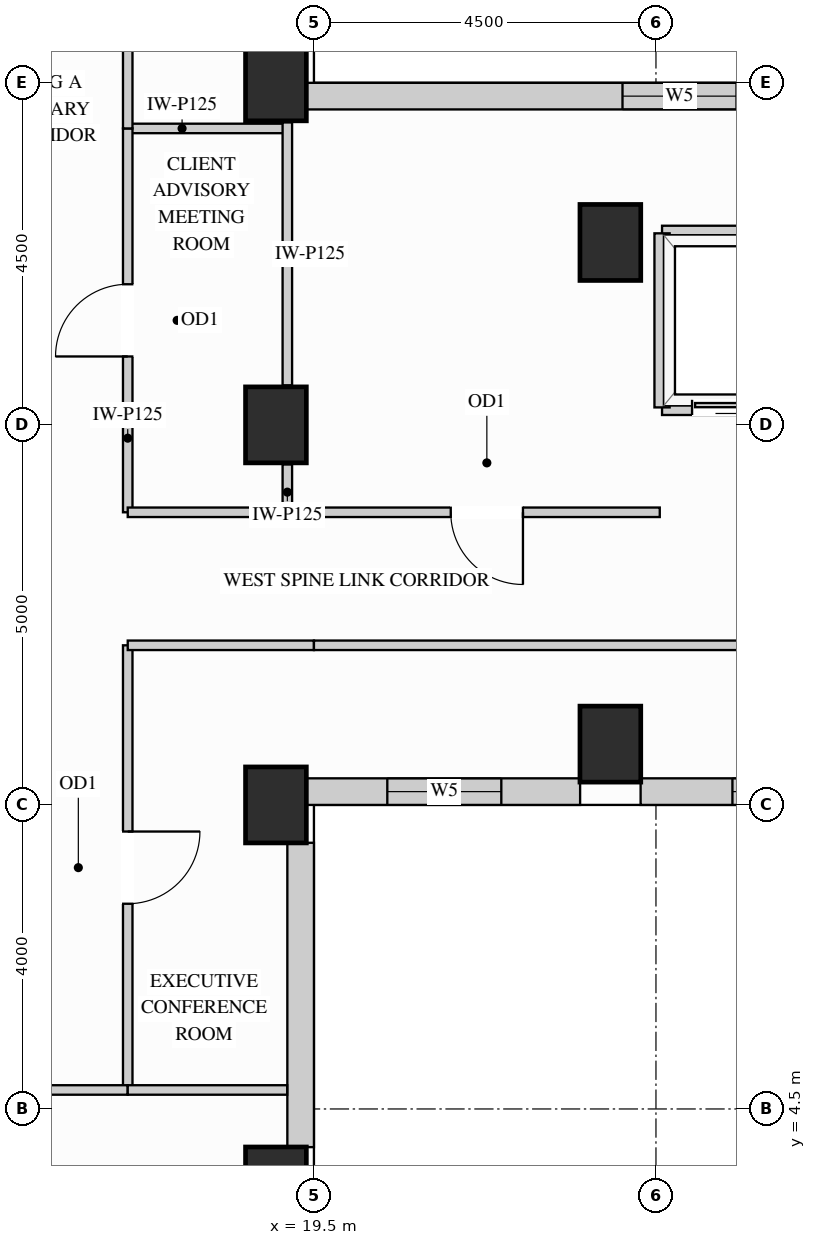
"""IFC4 building model, lengths in metres.
Left out: names, types, materials, properties, quantities, classifications, styles, units other than length and angle.
Written with IfcOpenShell. Run it as: python <this file> out.ifc"""

import sys

from ifc_helpers import new_model, si_unit, direction, frame, frame_2d, origin, origin_2d, place, context, subcontext, project, spatial, rectangle, extrude, source, transform, mapped, element, fill, save


model = new_model("IFC4")
c1 = context("Model", 3, precision=1e-05, world=origin(), true_north=direction((0.0, 1.0)))
c2 = subcontext(c1, "Body", "Model", "MODEL_VIEW")
j1 = project(units=[si_unit("LENGTHUNIT", "METRE"), si_unit("PLANEANGLEUNIT", "RADIAN")], contexts=[c1])
p1 = place(None, origin())
s1 = spatial("IfcSite", under=j1, at=p1, CompositionType="ELEMENT")
p2 = place(p1, origin())
s2 = spatial("IfcBuilding", under=s1, at=p2, CompositionType="ELEMENT")
p3 = place(p2, frame((0.0, 0.0, 164.7)))
s3 = spatial("IfcBuildingStorey", under=s2, at=p3, CompositionType="ELEMENT", Elevation=164.7)
m1 = source(origin(), c2, "Body", "SweptSolid", [
    extrude(rectangle(XDim=0.8, YDim=1.0, at=origin_2d()), origin(), (0.0, 0.0, 1.0), 3.4),
])
for number, where, z_axis, x_axis in (
    (1, (19.0, 13.5, 0.0), (0.0, 0.0, 1.0), (1.0, 0.0, 0.0)),
    (2, (19.0, 18.0, 0.0), (0.0, 0.0, 1.0), (1.0, 0.0, 0.0)),
    (3, (19.0, 3.5, 0.0), (0.0, 0.0, 1.0), (1.0, 0.0, 0.0)),
    (4, (19.0, 8.5, 0.0), (0.0, 0.0, 1.0), (1.0, 0.0, 0.0)),
    (5, (23.4, 15.9, 0.0), (0.0, 0.0, 1.0), (1.0, 0.0, 0.0)),
    (6, (23.4, 9.3, 0.0), (0.0, 0.0, 1.0), (1.0, 0.0, 0.0)),
):
    element("IfcColumn", number, at=place(p3, frame(where, z_axis=z_axis, x_axis=x_axis)), inside=s3, PredefinedType="COLUMN", context=c2, shape_type="MappedRepresentation", body=[
        mapped(m1, transform((0.0, 0.0, 0.0), x_axis=(1.0, 0.0, 0.0), y_axis=(0.0, 1.0, 0.0), z_axis=(0.0, 0.0, 1.0))),
    ])
m2 = source(origin(), c2, "Body", "SweptSolid", [
    extrude(rectangle(XDim=4.004, YDim=0.35, at=frame_2d((2.002, 0.0))), origin(), (0.0, 0.0, 1.0), 2.612),
])
p4 = place(p3, frame((19.325, 3.998, 0.0), z_axis=(0.0, 0.0, 1.0), x_axis=(0.0, 1.0, 0.0)))
e7 = element("IfcWall", 7, at=p4, inside=s3, PredefinedType="SOLIDWALL", context=c2, shape_type="MappedRepresentation", body=[
    mapped(m2, transform((0.0, 0.0, 0.0), x_axis=(1.0, 0.0, 0.0), y_axis=(0.0, 1.0, 0.0), z_axis=(0.0, 0.0, 1.0))),
])
p5 = place(p3, frame((19.398, 8.675, 0.0), z_axis=(0.0, 0.0, 1.0), x_axis=(1.0, 0.0, 0.0)))
e8 = element("IfcWall", 8, at=p5, inside=s3, PredefinedType="SOLIDWALL", context=c2, shape_type="SweptSolid", body=[
    extrude(rectangle(XDim=3.604, YDim=0.35, at=frame_2d((1.802, 0.0))), origin(), (0.0, 0.0, 1.0), 3.385),
])
p6 = place(p5, frame((1.067, 0.0, 0.78)))
e9 = element("IfcOpeningElement", 9, at=p6, cuts=e8, PredefinedType="OPENING", context=c2, shape_type="SweptSolid", body=[
    extrude(rectangle(XDim=1.5, YDim=2.0, at=frame_2d((0.75, 1.0))), frame((0.0, 0.185, 0.0), z_axis=(0.0, -1.0, 0.0), x_axis=(1.0, 0.0, 0.0)), (0.0, 0.0, 1.0), 0.37),
])
p7 = place(p3, frame((23.798, 8.675, 0.0), z_axis=(0.0, 0.0, 1.0), x_axis=(1.0, 0.0, 0.0)))
e10 = element("IfcWall", 10, at=p7, inside=s3, PredefinedType="SOLIDWALL", context=c2, shape_type="SweptSolid", body=[
    extrude(rectangle(XDim=6.304, YDim=0.35, at=frame_2d((3.152, 0.0))), origin(), (0.0, 0.0, 1.0), 3.385),
])
p8 = place(p7, frame((1.208, 0.0, 0.78)))
e11 = element("IfcOpeningElement", 11, at=p8, cuts=e10, PredefinedType="OPENING", context=c2, shape_type="SweptSolid", body=[
    extrude(rectangle(XDim=1.5, YDim=2.0, at=frame_2d((0.75, 1.0))), frame((0.0, 0.185, 0.0), z_axis=(0.0, -1.0, 0.0), x_axis=(1.0, 0.0, 0.0)), (0.0, 0.0, 1.0), 0.37),
])
p9 = place(p7, frame((3.596, 0.0, 0.78)))
e12 = element("IfcOpeningElement", 12, at=p9, cuts=e10, PredefinedType="OPENING", context=c2, shape_type="SweptSolid", body=[
    extrude(rectangle(XDim=1.5, YDim=2.0, at=frame_2d((0.75, 1.0))), frame((0.0, 0.185, 0.0), z_axis=(0.0, -1.0, 0.0), x_axis=(1.0, 0.0, 0.0)), (0.0, 0.0, 1.0), 0.37),
])
p10 = place(p3, frame((34.502, 17.825, 0.0), z_axis=(0.0, 0.0, 1.0), x_axis=(-1.0, 0.0, 0.0)))
e13 = element("IfcWall", 13, at=p10, inside=s3, PredefinedType="SOLIDWALL", context=c2, shape_type="SweptSolid", body=[
    extrude(rectangle(XDim=15.104, YDim=0.35, at=frame_2d((7.552, 0.0))), origin(), (0.0, 0.0, 1.0), 3.385),
])
p11 = place(p10, frame((4.131, 0.0, 0.78)))
e14 = element("IfcOpeningElement", 14, at=p11, cuts=e13, PredefinedType="OPENING", context=c2, shape_type="SweptSolid", body=[
    extrude(rectangle(XDim=1.5, YDim=2.0, at=frame_2d((0.75, 1.0))), frame((0.0, 0.185, 0.0), z_axis=(0.0, -1.0, 0.0), x_axis=(1.0, 0.0, 0.0)), (0.0, 0.0, 1.0), 0.37),
])
p12 = place(p10, frame((9.442, 0.0, 0.78)))
e15 = element("IfcOpeningElement", 15, at=p12, cuts=e13, PredefinedType="OPENING", context=c2, shape_type="SweptSolid", body=[
    extrude(rectangle(XDim=1.5, YDim=2.0, at=frame_2d((0.75, 1.0))), frame((0.0, 0.185, 0.0), z_axis=(0.0, -1.0, 0.0), x_axis=(1.0, 0.0, 0.0)), (0.0, 0.0, 1.0), 0.37),
])
m3 = source(origin(), c2, "Body", "SweptSolid", [
    extrude(rectangle(XDim=2.1, YDim=0.125, at=frame_2d((1.05, 0.0))), origin(), (0.0, 0.0, 1.0), 3.385),
])
p13 = place(p3, frame((17.05, 17.4, 0.0), z_axis=(0.0, 0.0, 1.0), x_axis=(1.0, 0.0, 0.0)))
e16 = element("IfcWall", 16, at=p13, inside=s3, PredefinedType="PARTITIONING", context=c2, shape_type="MappedRepresentation", body=[
    mapped(m3, transform((0.0, 0.0, 0.0), x_axis=(1.0, 0.0, 0.0), y_axis=(0.0, 1.0, 0.0), z_axis=(0.0, 0.0, 1.0))),
])
m4 = source(origin(), c2, "Body", "SweptSolid", [
    extrude(rectangle(XDim=0.63, YDim=0.125, at=frame_2d((0.315, 0.0))), origin(), (0.0, 0.0, 1.0), 2.773),
])
p14 = place(p3, frame((19.15, 12.35, 0.0), z_axis=(0.0, 0.0, 1.0), x_axis=(0.0, 1.0, 0.0)))
e17 = element("IfcWall", 17, at=p14, inside=s3, PredefinedType="PARTITIONING", context=c2, shape_type="MappedRepresentation", body=[
    mapped(m4, transform((0.0, 0.0, 0.0), x_axis=(1.0, 0.0, 0.0), y_axis=(0.0, 1.0, 0.0), z_axis=(0.0, 0.0, 1.0))),
])
m5 = source(origin(), c2, "Body", "SweptSolid", [
    extrude(rectangle(XDim=3.46, YDim=0.125, at=frame_2d((1.73, 0.0))), origin(), (0.0, 0.0, 1.0), 2.773),
])
p15 = place(p3, frame((19.15, 14.02, 0.0), z_axis=(0.0, 0.0, 1.0), x_axis=(0.0, 1.0, 0.0)))
e18 = element("IfcWall", 18, at=p15, inside=s3, PredefinedType="PARTITIONING", context=c2, shape_type="MappedRepresentation", body=[
    mapped(m5, transform((0.0, 0.0, 0.0), x_axis=(1.0, 0.0, 0.0), y_axis=(0.0, 1.0, 0.0), z_axis=(0.0, 0.0, 1.0))),
])
p16 = place(p3, frame((17.05, 12.35, 0.0), z_axis=(0.0, 0.0, 1.0), x_axis=(0.0, 1.0, 0.0)))
e19 = element("IfcWall", 19, at=p16, inside=s3, PredefinedType="PARTITIONING", context=c2, shape_type="SweptSolid", body=[
    extrude(rectangle(XDim=5.05, YDim=0.125, at=frame_2d((2.525, 0.0))), origin(), (0.0, 0.0, 1.0), 3.385),
])
p17 = place(p16, frame((2.05, 0.0, 0.0)))
e20 = element("IfcOpeningElement", 20, at=p17, cuts=e19, PredefinedType="OPENING", context=c2, shape_type="SweptSolid", body=[
    extrude(rectangle(XDim=0.95, YDim=2.15, at=frame_2d((0.475, 1.075))), frame((0.0, 0.073, 0.0), z_axis=(0.0, -1.0, 0.0), x_axis=(1.0, 0.0, 0.0)), (0.0, 0.0, 1.0), 0.145),
])
p18 = place(p3, frame((17.05, 17.4, 0.0), z_axis=(0.0, 0.0, 1.0), x_axis=(0.0, 1.0, 0.0)))
e21 = element("IfcWall", 21, at=p18, inside=s3, PredefinedType="PARTITIONING", context=c2, shape_type="SweptSolid", body=[
    extrude(rectangle(XDim=5.95, YDim=0.125, at=frame_2d((2.975, 0.0))), origin(), (0.0, 0.0, 1.0), 3.385),
])
p19 = place(p18, frame((2.5, 0.0, 0.0)))
e22 = element("IfcOpeningElement", 22, at=p19, cuts=e21, PredefinedType="OPENING", context=c2, shape_type="SweptSolid", body=[
    extrude(rectangle(XDim=0.95, YDim=2.15, at=frame_2d((0.475, 1.075))), frame((0.0, 0.073, 0.0), z_axis=(0.0, -1.0, 0.0), x_axis=(1.0, 0.0, 0.0)), (0.0, 0.0, 1.0), 0.145),
])
p20 = place(p3, frame((17.05, 4.75, 0.0), z_axis=(0.0, 0.0, 1.0), x_axis=(0.0, 1.0, 0.0)))
e23 = element("IfcWall", 23, at=p20, inside=s3, PredefinedType="PARTITIONING", context=c2, shape_type="SweptSolid", body=[
    extrude(rectangle(XDim=5.85, YDim=0.125, at=frame_2d((2.925, 0.0))), origin(), (0.0, 0.0, 1.0), 3.385),
])
p21 = place(p20, frame((2.45, 0.0, 0.0)))
e24 = element("IfcOpeningElement", 24, at=p21, cuts=e23, PredefinedType="OPENING", context=c2, shape_type="SweptSolid", body=[
    extrude(rectangle(XDim=0.95, YDim=2.15, at=frame_2d((0.475, 1.075))), frame((0.0, 0.073, 0.0), z_axis=(0.0, -1.0, 0.0), x_axis=(1.0, 0.0, 0.0)), (0.0, 0.0, 1.0), 0.145),
])
m6 = source(origin(), c2, "Body", "SweptSolid", [
    extrude(rectangle(XDim=2.45, YDim=0.125, at=frame_2d((1.225, 0.0))), origin(), (0.0, 0.0, 1.0), 3.385),
])
p22 = place(p3, frame((17.05, 12.35, 0.0), z_axis=(0.0, 0.0, 1.0), x_axis=(1.0, 0.0, 0.0)))
e25 = element("IfcWall", 25, at=p22, inside=s3, PredefinedType="PARTITIONING", context=c2, shape_type="MappedRepresentation", body=[
    mapped(m6, transform((0.0, 0.0, 0.0), x_axis=(1.0, 0.0, 0.0), y_axis=(0.0, 1.0, 0.0), z_axis=(0.0, 0.0, 1.0))),
])
p23 = place(p3, frame((19.5, 12.35, 0.0), z_axis=(0.0, 0.0, 1.0), x_axis=(1.0, 0.0, 0.0)))
e26 = element("IfcWall", 26, at=p23, inside=s3, PredefinedType="PARTITIONING", context=c2, shape_type="SweptSolid", body=[
    extrude(rectangle(XDim=4.55, YDim=0.125, at=frame_2d((2.275, 0.0))), origin(), (0.0, 0.0, 1.0), 3.385),
])
p24 = place(p23, frame((1.8, 0.0, 0.0)))
e27 = element("IfcOpeningElement", 27, at=p24, cuts=e26, PredefinedType="OPENING", context=c2, shape_type="SweptSolid", body=[
    extrude(rectangle(XDim=0.95, YDim=2.15, at=frame_2d((0.475, 1.075))), frame((0.0, 0.073, 0.0), z_axis=(0.0, -1.0, 0.0), x_axis=(1.0, 0.0, 0.0)), (0.0, 0.0, 1.0), 0.145),
])
p25 = place(p3, frame((17.05, 10.6, 0.0), z_axis=(0.0, 0.0, 1.0), x_axis=(1.0, 0.0, 0.0)))
e28 = element("IfcWall", 28, at=p25, inside=s3, PredefinedType="PARTITIONING", context=c2, shape_type="MappedRepresentation", body=[
    mapped(m6, transform((0.0, 0.0, 0.0), x_axis=(1.0, 0.0, 0.0), y_axis=(0.0, 1.0, 0.0), z_axis=(0.0, 0.0, 1.0))),
])
p26 = place(p3, frame((19.5, 10.6, 0.0), z_axis=(0.0, 0.0, 1.0), x_axis=(1.0, 0.0, 0.0)))
e29 = element("IfcWall", 29, at=p26, inside=s3, PredefinedType="PARTITIONING", context=c2, shape_type="SweptSolid", body=[
    extrude(rectangle(XDim=14.9, YDim=0.125, at=frame_2d((7.45, 0.0))), origin(), (0.0, 0.0, 1.0), 3.385),
])
p27 = place(p26, frame((6.975, 0.0, 0.0)))
e30 = element("IfcOpeningElement", 30, at=p27, cuts=e29, PredefinedType="OPENING", context=c2, shape_type="SweptSolid", body=[
    extrude(rectangle(XDim=0.95, YDim=2.15, at=frame_2d((0.475, 1.075))), frame((0.0, 0.073, 0.0), z_axis=(0.0, -1.0, 0.0), x_axis=(1.0, 0.0, 0.0)), (0.0, 0.0, 1.0), 0.145),
])
p28 = place(p3, frame((13.026, 4.75, 0.0), z_axis=(0.0, 0.0, 1.0), x_axis=(1.0, 0.0, 0.0)))
e31 = element("IfcWall", 31, at=p28, inside=s3, PredefinedType="PARTITIONING", context=c2, shape_type="SweptSolid", body=[
    extrude(rectangle(XDim=4.024, YDim=0.125, at=frame_2d((2.012, 0.0))), origin(), (0.0, 0.0, 1.0), 2.848),
])
p29 = place(p28, frame((1.537, 0.0, 0.0)))
e32 = element("IfcOpeningElement", 32, at=p29, cuts=e31, PredefinedType="OPENING", context=c2, shape_type="SweptSolid", body=[
    extrude(rectangle(XDim=0.95, YDim=2.15, at=frame_2d((0.475, 1.075))), frame((0.0, 0.073, 0.0), z_axis=(0.0, -1.0, 0.0), x_axis=(1.0, 0.0, 0.0)), (0.0, 0.0, 1.0), 0.145),
])
m7 = source(origin(), c2, "Body", "SweptSolid", [
    extrude(rectangle(XDim=2.098, YDim=0.125, at=frame_2d((1.049, 0.0))), origin(), (0.0, 0.0, 1.0), 2.848),
])
p30 = place(p3, frame((17.05, 4.75, 0.0), z_axis=(0.0, 0.0, 1.0), x_axis=(1.0, 0.0, 0.0)))
e33 = element("IfcWall", 33, at=p30, inside=s3, PredefinedType="PARTITIONING", context=c2, shape_type="MappedRepresentation", body=[
    mapped(m7, transform((0.0, 0.0, 0.0), x_axis=(1.0, 0.0, 0.0), y_axis=(0.0, 1.0, 0.0), z_axis=(0.0, 0.0, 1.0))),
])
m8 = source(origin(), c2, "Body", "SweptSolid", [
    extrude(rectangle(XDim=1.89, YDim=0.2, at=frame_2d((0.945, 0.0))), origin(), (0.0, 0.0, 1.0), 2.773),
])
p31 = place(p3, frame((24.08, 16.02, 0.0), z_axis=(0.0, 0.0, 1.0), x_axis=(1.0, 0.0, 0.0)))
e34 = element("IfcWall", 34, at=p31, inside=s3, PredefinedType="PARTITIONING", context=c2, shape_type="MappedRepresentation", body=[
    mapped(m8, transform((0.0, 0.0, 0.0), x_axis=(1.0, 0.0, 0.0), y_axis=(0.0, 1.0, 0.0), z_axis=(0.0, 0.0, 1.0))),
])
p32 = place(p3, frame((24.08, 13.73, 0.0), z_axis=(0.0, 0.0, 1.0), x_axis=(1.0, 0.0, 0.0)))
e35 = element("IfcWall", 35, at=p32, inside=s3, PredefinedType="PARTITIONING", context=c2, shape_type="SweptSolid", body=[
    extrude(rectangle(XDim=1.89, YDim=0.2, at=frame_2d((0.945, 0.0))), origin(), (0.0, 0.0, 1.0), 2.466),
])
p33 = place(p32, frame((0.395, 0.0, 0.0)))
e36 = element("IfcOpeningElement", 36, at=p33, cuts=e35, PredefinedType="OPENING", context=c2, shape_type="SweptSolid", body=[
    extrude(rectangle(XDim=1.1, YDim=2.2, at=frame_2d((0.55, 1.1))), frame((0.0, 0.11, 0.0), z_axis=(0.0, -1.0, 0.0), x_axis=(1.0, 0.0, 0.0)), (0.0, 0.0, 1.0), 0.22),
])
m9 = source(origin(), c2, "Body", "SweptSolid", [
    extrude(rectangle(XDim=2.29, YDim=0.2, at=frame_2d((1.145, 0.0))), origin(), (0.0, 0.0, 1.0), 3.385),
])
p34 = place(p3, frame((24.08, 13.73, 0.0), z_axis=(0.0, 0.0, 1.0), x_axis=(0.0, 1.0, 0.0)))
e37 = element("IfcWall", 37, at=p34, inside=s3, PredefinedType="PARTITIONING", context=c2, shape_type="MappedRepresentation", body=[
    mapped(m9, transform((0.0, 0.0, 0.0), x_axis=(1.0, 0.0, 0.0), y_axis=(0.0, 1.0, 0.0), z_axis=(0.0, 0.0, 1.0))),
])
m10 = source(origin(), c2, "Body", "SweptSolid", [
    extrude(rectangle(XDim=1.1, YDim=2.2, at=frame_2d((0.55, 1.1))), frame((0.0, 0.025, 0.0), z_axis=(0.0, -1.0, 0.0), x_axis=(1.0, 0.0, 0.0)), (0.0, 0.0, 1.0), 0.05),
])
p35 = place(p33, origin())
e38 = element("IfcDoor", 38, at=p35, inside=s3, OperationType="SLIDING_TO_LEFT", PredefinedType="DOOR", context=c2, shape_type="MappedRepresentation", body=[
    mapped(m10, transform((0.0, 0.0, 0.0), x_axis=(1.0, 0.0, 0.0), y_axis=(0.0, 1.0, 0.0), z_axis=(0.0, 0.0, 1.0))),
])
fill(e36, e38)
m11 = source(origin(), c2, "Body", "SweptSolid", [
    extrude(rectangle(XDim=0.95, YDim=2.15, at=frame_2d((0.475, 1.075))), frame((0.0, 0.025, 0.0), z_axis=(0.0, -1.0, 0.0), x_axis=(1.0, 0.0, 0.0)), (0.0, 0.0, 1.0), 0.05),
])
p36 = place(p21, origin())
e39 = element("IfcDoor", 39, at=p36, inside=s3, OperationType="SINGLE_SWING_RIGHT", PredefinedType="DOOR", context=c2, shape_type="MappedRepresentation", body=[
    mapped(m11, transform((0.0, 0.0, 0.0), x_axis=(1.0, 0.0, 0.0), y_axis=(0.0, 1.0, 0.0), z_axis=(0.0, 0.0, 1.0))),
])
fill(e24, e39)
p37 = place(p17, origin())
e40 = element("IfcDoor", 40, at=p37, inside=s3, OperationType="SINGLE_SWING_LEFT", PredefinedType="DOOR", context=c2, shape_type="MappedRepresentation", body=[
    mapped(m11, transform((0.0, 0.0, 0.0), x_axis=(1.0, 0.0, 0.0), y_axis=(0.0, 1.0, 0.0), z_axis=(0.0, 0.0, 1.0))),
])
fill(e20, e40)
p38 = place(p24, origin())
e41 = element("IfcDoor", 41, at=p38, inside=s3, OperationType="SINGLE_SWING_RIGHT", PredefinedType="DOOR", context=c2, shape_type="MappedRepresentation", body=[
    mapped(m11, transform((0.0, 0.0, 0.0), x_axis=(1.0, 0.0, 0.0), y_axis=(0.0, 1.0, 0.0), z_axis=(0.0, 0.0, 1.0))),
])
fill(e27, e41)
m12 = source(origin(), c2, "Body", "SweptSolid", [
    extrude(rectangle(XDim=1.5, YDim=2.0, at=frame_2d((0.75, 1.0))), frame((0.0, 0.03, 0.0), z_axis=(0.0, -1.0, 0.0), x_axis=(1.0, 0.0, 0.0)), (0.0, 0.0, 1.0), 0.06),
])
p39 = place(p6, origin())
e42 = element("IfcWindow", 42, at=p39, inside=s3, PartitioningType="SINGLE_PANEL", PredefinedType="WINDOW", context=c2, shape_type="MappedRepresentation", body=[
    mapped(m12, transform((0.0, 0.0, 0.0), x_axis=(1.0, 0.0, 0.0), y_axis=(0.0, 1.0, 0.0), z_axis=(0.0, 0.0, 1.0))),
])
fill(e9, e42)
p40 = place(p8, origin())
e43 = element("IfcWindow", 43, at=p40, inside=s3, PartitioningType="SINGLE_PANEL", PredefinedType="WINDOW", context=c2, shape_type="MappedRepresentation", body=[
    mapped(m12, transform((0.0, 0.0, 0.0), x_axis=(1.0, 0.0, 0.0), y_axis=(0.0, 1.0, 0.0), z_axis=(0.0, 0.0, 1.0))),
])
fill(e11, e43)
p41 = place(p12, origin())
e44 = element("IfcWindow", 44, at=p41, inside=s3, PartitioningType="SINGLE_PANEL", PredefinedType="WINDOW", context=c2, shape_type="MappedRepresentation", body=[
    mapped(m12, transform((0.0, 0.0, 0.0), x_axis=(1.0, 0.0, 0.0), y_axis=(0.0, 1.0, 0.0), z_axis=(0.0, 0.0, 1.0))),
])
fill(e15, e44)
save(model, sys.argv[1])
